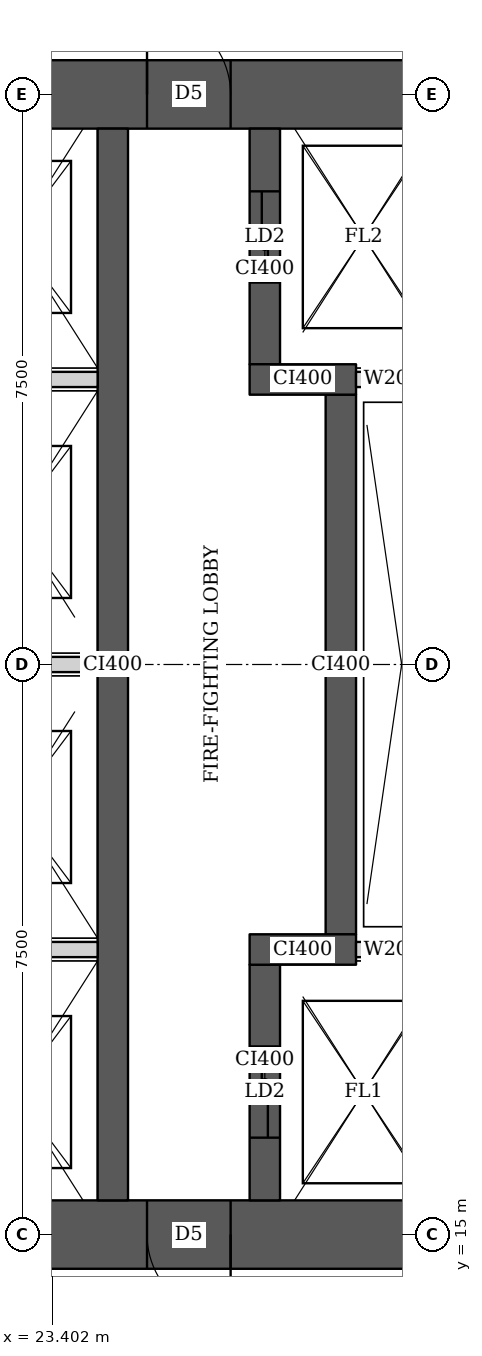
"""IFC4 building model, lengths in metres.
Left out: names, types, materials, properties, quantities, classifications, styles, units other than length and angle.
Written with IfcOpenShell. Run it as: python <this file> out.ifc"""

import sys

from ifc_helpers import new_model, si_unit, direction, frame, frame_2d, origin, place, context, subcontext, project, spatial, rectangle, extrude, element, fill, save


model = new_model("IFC4")
c1 = context("Model", 3, precision=1e-05, world=origin(), true_north=direction((0.0, 1.0)))
c2 = subcontext(c1, "Body", "Model", "MODEL_VIEW")
j1 = project(units=[si_unit("LENGTHUNIT", "METRE"), si_unit("PLANEANGLEUNIT", "RADIAN")], contexts=[c1])
p1 = place(None, origin())
s1 = spatial("IfcSite", under=j1, at=p1, CompositionType="ELEMENT")
p2 = place(p1, origin())
s2 = spatial("IfcBuilding", under=s1, at=p2, CompositionType="ELEMENT")
p3 = place(p2, frame((0.0, 0.0, 188.3)))
s3 = spatial("IfcBuildingStorey", under=s2, at=p3, CompositionType="ELEMENT", Elevation=188.3)
p4 = place(p3, frame((13.95, 15.0, 0.0), z_axis=(0.0, 0.0, 1.0), x_axis=(1.0, 0.0, 0.0)))
e1 = element("IfcWall", 1, at=p4, inside=s3, PredefinedType="SHEAR", context=c2, shape_type="SweptSolid", body=[
    extrude(rectangle(XDim=15.3, YDim=0.9, at=frame_2d((7.65, 0.0))), origin(), (0.0, 0.0, 1.0), 5.4),
])
p5 = place(p4, frame((4.45, 0.0, 0.0)))
e2 = element("IfcOpeningElement", 2, at=p5, cuts=e1, PredefinedType="OPENING", context=c2, shape_type="SweptSolid", body=[
    extrude(rectangle(XDim=1.8, YDim=2.1, at=frame_2d((0.9, 1.05))), frame((0.0, 0.46, 0.0), z_axis=(0.0, -1.0, 0.0), x_axis=(1.0, 0.0, 0.0)), (0.0, 0.0, 1.0), 0.92),
])
p6 = place(p4, frame((10.7, 0.0, 0.0)))
e3 = element("IfcOpeningElement", 3, at=p6, cuts=e1, PredefinedType="OPENING", context=c2, shape_type="SweptSolid", body=[
    extrude(rectangle(XDim=1.1, YDim=2.1, at=frame_2d((0.55, 1.05))), frame((0.0, 0.46, 0.0), z_axis=(0.0, -1.0, 0.0), x_axis=(1.0, 0.0, 0.0)), (0.0, 0.0, 1.0), 0.92),
])
p7 = place(p3, frame((13.95, 30.0, 0.0), z_axis=(0.0, 0.0, 1.0), x_axis=(1.0, 0.0, 0.0)))
e4 = element("IfcWall", 4, at=p7, inside=s3, PredefinedType="SHEAR", context=c2, shape_type="SweptSolid", body=[
    extrude(rectangle(XDim=15.3, YDim=0.9, at=frame_2d((7.65, 0.0))), origin(), (0.0, 0.0, 1.0), 5.4),
])
p8 = place(p7, frame((4.45, 0.0, 0.0)))
e5 = element("IfcOpeningElement", 5, at=p8, cuts=e4, PredefinedType="OPENING", context=c2, shape_type="SweptSolid", body=[
    extrude(rectangle(XDim=1.8, YDim=2.1, at=frame_2d((0.9, 1.05))), frame((0.0, 0.46, 0.0), z_axis=(0.0, -1.0, 0.0), x_axis=(1.0, 0.0, 0.0)), (0.0, 0.0, 1.0), 0.92),
])
p9 = place(p7, frame((10.7, 0.0, 0.0)))
e6 = element("IfcOpeningElement", 6, at=p9, cuts=e4, PredefinedType="OPENING", context=c2, shape_type="SweptSolid", body=[
    extrude(rectangle(XDim=1.1, YDim=2.1, at=frame_2d((0.55, 1.05))), frame((0.0, 0.46, 0.0), z_axis=(0.0, -1.0, 0.0), x_axis=(1.0, 0.0, 0.0)), (0.0, 0.0, 1.0), 0.92),
])
p10 = place(p3, frame((24.2, 15.45, 0.0), z_axis=(0.0, 0.0, 1.0), x_axis=(0.0, 1.0, 0.0)))
e7 = element("IfcWall", 7, at=p10, inside=s3, PredefinedType="SHEAR", context=c2, shape_type="SweptSolid", body=[
    extrude(rectangle(XDim=14.1, YDim=0.4, at=frame_2d((7.05, 0.0))), origin(), (0.0, 0.0, 1.0), 5.4),
])
p11 = place(p3, frame((26.2, 15.45, 0.0), z_axis=(0.0, 0.0, 1.0), x_axis=(0.0, 1.0, 0.0)))
e8 = element("IfcWall", 8, at=p11, inside=s3, PredefinedType="SHEAR", context=c2, shape_type="SweptSolid", body=[
    extrude(rectangle(XDim=3.1, YDim=0.4, at=frame_2d((1.55, 0.0))), origin(), (0.0, 0.0, 1.0), 5.4),
])
p12 = place(p11, frame((0.825, 0.0, 0.0)))
e9 = element("IfcOpeningElement", 9, at=p12, cuts=e8, PredefinedType="OPENING", context=c2, shape_type="SweptSolid", body=[
    extrude(rectangle(XDim=1.2, YDim=2.1, at=frame_2d((0.6, 1.05))), frame((0.0, 0.21, 0.0), z_axis=(0.0, -1.0, 0.0), x_axis=(1.0, 0.0, 0.0)), (0.0, 0.0, 1.0), 0.42),
])
p13 = place(p3, frame((26.0, 18.75, 0.0), z_axis=(0.0, 0.0, 1.0), x_axis=(1.0, 0.0, 0.0)))
e10 = element("IfcWall", 10, at=p13, inside=s3, PredefinedType="SHEAR", context=c2, shape_type="SweptSolid", body=[
    extrude(rectangle(XDim=1.4, YDim=0.4, at=frame_2d((0.7, 0.0))), origin(), (0.0, 0.0, 1.0), 5.4),
])
p14 = place(p3, frame((27.2, 18.95, 0.0), z_axis=(0.0, 0.0, 1.0), x_axis=(0.0, 1.0, 0.0)))
e11 = element("IfcWall", 11, at=p14, inside=s3, PredefinedType="SHEAR", context=c2, shape_type="SweptSolid", body=[
    extrude(rectangle(XDim=7.1, YDim=0.4, at=frame_2d((3.55, 0.0))), origin(), (0.0, 0.0, 1.0), 5.4),
])
p15 = place(p3, frame((26.0, 26.25, 0.0), z_axis=(0.0, 0.0, 1.0), x_axis=(1.0, 0.0, 0.0)))
e12 = element("IfcWall", 12, at=p15, inside=s3, PredefinedType="SHEAR", context=c2, shape_type="SweptSolid", body=[
    extrude(rectangle(XDim=1.4, YDim=0.4, at=frame_2d((0.7, 0.0))), origin(), (0.0, 0.0, 1.0), 5.4),
])
p16 = place(p3, frame((26.2, 26.45, 0.0), z_axis=(0.0, 0.0, 1.0), x_axis=(0.0, 1.0, 0.0)))
e13 = element("IfcWall", 13, at=p16, inside=s3, PredefinedType="SHEAR", context=c2, shape_type="SweptSolid", body=[
    extrude(rectangle(XDim=3.1, YDim=0.4, at=frame_2d((1.55, 0.0))), origin(), (0.0, 0.0, 1.0), 5.4),
])
p17 = place(p16, frame((1.075, 0.0, 0.0)))
e14 = element("IfcOpeningElement", 14, at=p17, cuts=e13, PredefinedType="OPENING", context=c2, shape_type="SweptSolid", body=[
    extrude(rectangle(XDim=1.2, YDim=2.1, at=frame_2d((0.6, 1.05))), frame((0.0, 0.21, 0.0), z_axis=(0.0, -1.0, 0.0), x_axis=(1.0, 0.0, 0.0)), (0.0, 0.0, 1.0), 0.42),
])
for number, where, z_axis, x_axis in (
    (15, (21.8, 18.75, 0.0), (0.0, 0.0, 1.0), (1.0, 0.0, 0.0)),
    (16, (21.8, 22.5, 0.0), (0.0, 0.0, 1.0), (1.0, 0.0, 0.0)),
    (17, (21.8, 26.25, 0.0), (0.0, 0.0, 1.0), (1.0, 0.0, 0.0)),
):
    element("IfcWall", number, at=place(p3, frame(where, z_axis=z_axis, x_axis=x_axis)), inside=s3, PredefinedType="SOLIDWALL", context=c2, shape_type="SweptSolid", body=[
        extrude(rectangle(XDim=2.2, YDim=0.2, at=frame_2d((1.1, 0.0))), origin(), (0.0, 0.0, 1.0), 5.15),
    ])
for number, where, z_axis, x_axis in (
    (18, (27.4, 18.75, 0.0), (0.0, 0.0, 1.0), (1.0, 0.0, 0.0)),
    (19, (27.4, 26.25, 0.0), (0.0, 0.0, 1.0), (1.0, 0.0, 0.0)),
):
    element("IfcWall", number, at=place(p3, frame(where, z_axis=z_axis, x_axis=x_axis)), inside=s3, PredefinedType="SOLIDWALL", context=c2, shape_type="SweptSolid", body=[
        extrude(rectangle(XDim=0.95, YDim=0.2, at=frame_2d((0.475, 0.0))), origin(), (0.0, 0.0, 1.0), 5.15),
    ])
p18 = place(p6, origin())
e20 = element("IfcDoor", 20, at=p18, inside=s3, OperationType="SINGLE_SWING_LEFT", PredefinedType="DOOR", context=c2, shape_type="SweptSolid", body=[
    extrude(rectangle(XDim=1.1, YDim=2.1, at=frame_2d((0.55, 1.05))), frame((0.0, 0.025, 0.0), z_axis=(0.0, -1.0, 0.0), x_axis=(1.0, 0.0, 0.0)), (0.0, 0.0, 1.0), 0.05),
])
fill(e3, e20)
p19 = place(p9, origin())
e21 = element("IfcDoor", 21, at=p19, inside=s3, OperationType="SINGLE_SWING_LEFT", PredefinedType="DOOR", context=c2, shape_type="SweptSolid", body=[
    extrude(rectangle(XDim=1.1, YDim=2.1, at=frame_2d((0.55, 1.05))), frame((0.0, 0.025, 0.0), z_axis=(0.0, -1.0, 0.0), x_axis=(1.0, 0.0, 0.0)), (0.0, 0.0, 1.0), 0.05),
])
fill(e6, e21)
p20 = place(p12, origin())
e22 = element("IfcDoor", 22, at=p20, inside=s3, OperationType="DOUBLE_DOOR_SLIDING", PredefinedType="DOOR", context=c2, shape_type="SweptSolid", body=[
    extrude(rectangle(XDim=1.2, YDim=2.1, at=frame_2d((0.6, 1.05))), frame((0.0, 0.025, 0.0), z_axis=(0.0, -1.0, 0.0), x_axis=(1.0, 0.0, 0.0)), (0.0, 0.0, 1.0), 0.05),
])
fill(e9, e22)
p21 = place(p17, origin())
e23 = element("IfcDoor", 23, at=p21, inside=s3, OperationType="DOUBLE_DOOR_SLIDING", PredefinedType="DOOR", context=c2, shape_type="SweptSolid", body=[
    extrude(rectangle(XDim=1.2, YDim=2.1, at=frame_2d((0.6, 1.05))), frame((0.0, 0.025, 0.0), z_axis=(0.0, -1.0, 0.0), x_axis=(1.0, 0.0, 0.0)), (0.0, 0.0, 1.0), 0.05),
])
fill(e14, e23)
save(model, sys.argv[1])
